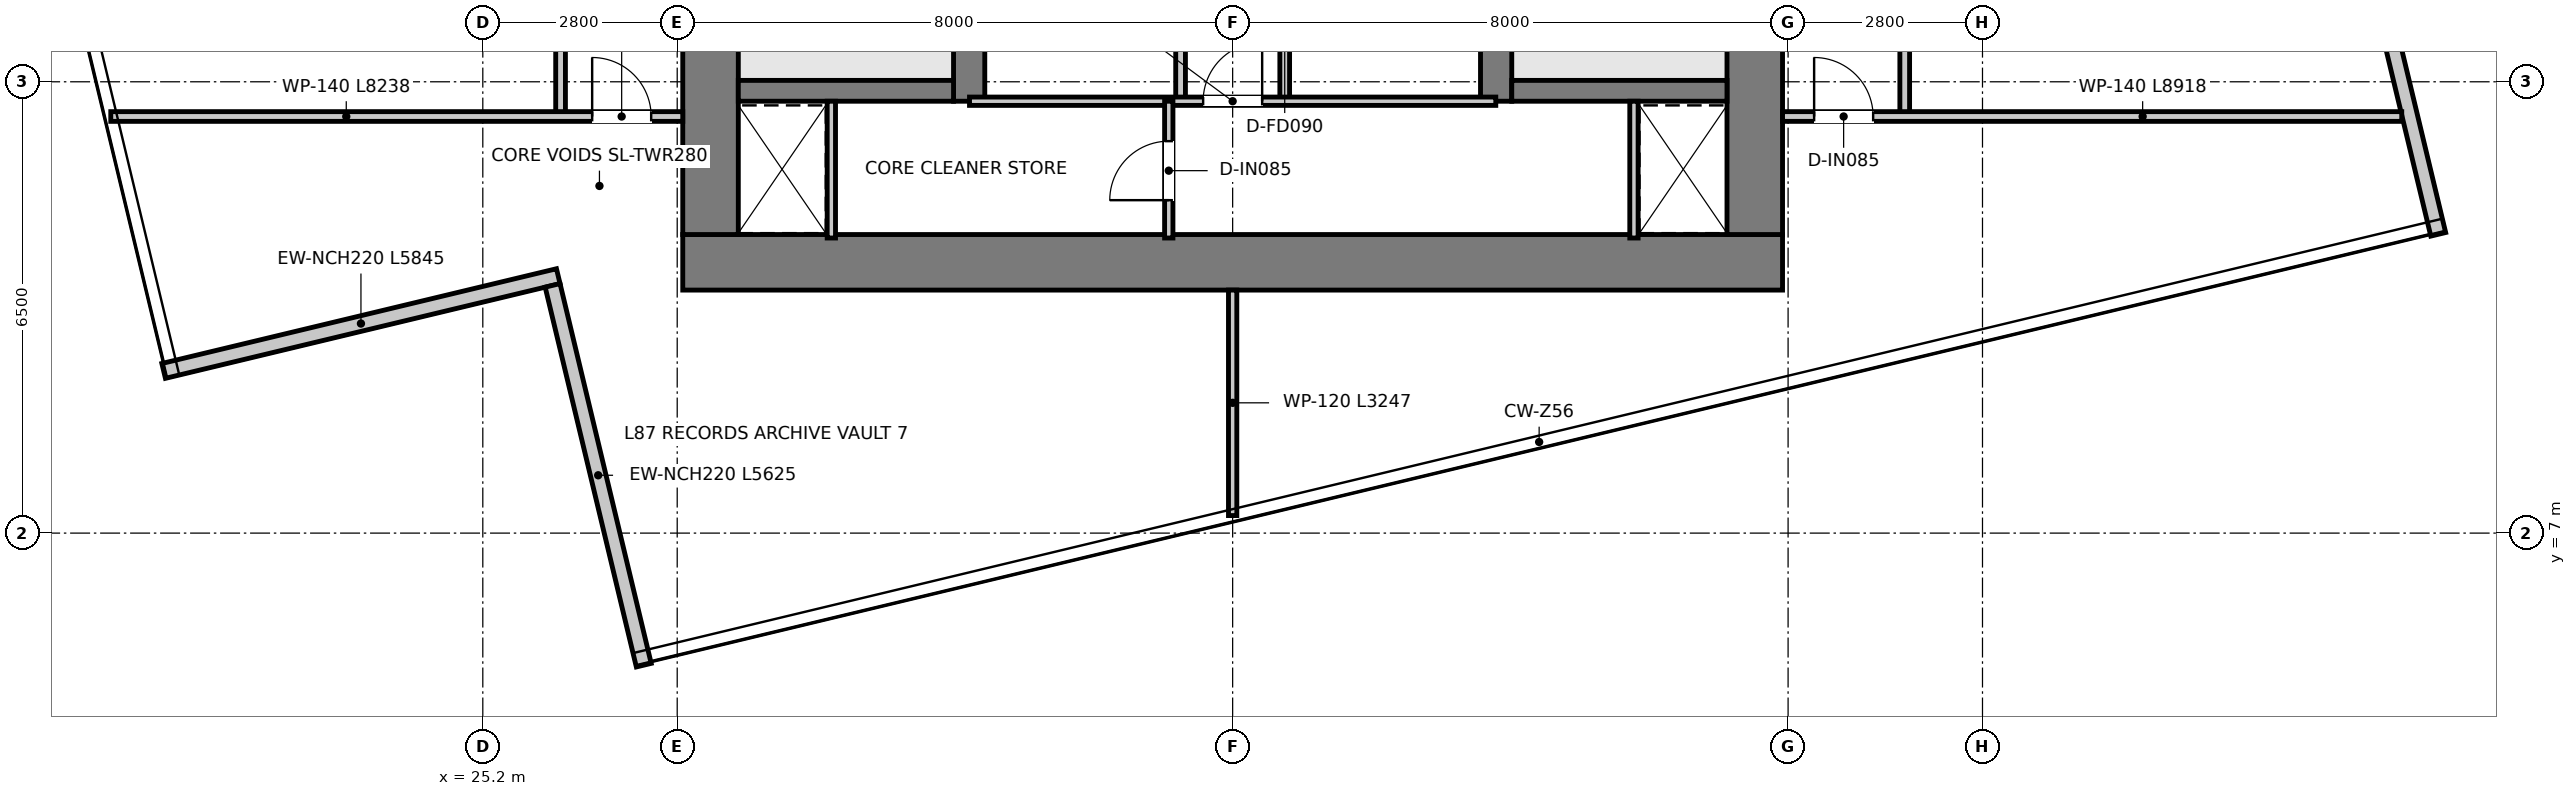
"""IFC4 building model, lengths in metres.
Left out: names, types, materials, properties, quantities, classifications, styles, units other than length and angle.
Written with IfcOpenShell. Run it as: python <this file> out.ifc"""

import sys

from ifc_helpers import new_model, si_unit, direction, frame, frame_2d, origin, place, context, subcontext, project, spatial, rectangle, extrude, element, fill, save


model = new_model("IFC4")
c1 = context("Model", 3, precision=1e-05, world=origin(), true_north=direction((0.0, 1.0)))
c2 = subcontext(c1, "Body", "Model", "MODEL_VIEW")
j1 = project(units=[si_unit("LENGTHUNIT", "METRE"), si_unit("PLANEANGLEUNIT", "RADIAN")], contexts=[c1])
p1 = place(None, origin())
s1 = spatial("IfcSite", under=j1, at=p1, CompositionType="ELEMENT")
p2 = place(p1, origin())
s2 = spatial("IfcBuilding", under=s1, at=p2, CompositionType="ELEMENT")
p3 = place(p2, frame((0.0, 0.0, 355.35)))
s3 = spatial("IfcBuildingStorey", under=s2, at=p3, CompositionType="ELEMENT", Elevation=355.35)
p4 = place(p3, frame((28.08, 10.9, 0.0), z_axis=(0.0, 0.0, 1.0), x_axis=(1.0, 0.0, 0.0)))
e1 = element("IfcWall", 1, at=p4, inside=s3, PredefinedType="SHEAR", context=c2, shape_type="SweptSolid", body=[
    extrude(rectangle(XDim=15.84, YDim=0.8, at=frame_2d((7.92, 0.0))), origin(), (0.0, 0.0, 1.0), 3.95),
])
for number, where, z_axis, x_axis in (
    (2, (28.48, 11.3, 0.0), (0.0, 0.0, 1.0), (0.0, 1.0, 0.0)),
    (3, (43.52, 11.3, 0.0), (0.0, 0.0, 1.0), (0.0, 1.0, 0.0)),
):
    element("IfcWall", number, at=place(p3, frame(where, z_axis=z_axis, x_axis=x_axis)), inside=s3, PredefinedType="SHEAR", context=c2, shape_type="SweptSolid", body=[
        extrude(rectangle(XDim=14.7, YDim=0.8, at=frame_2d((7.35, 0.0))), origin(), (0.0, 0.0, 1.0), 3.95),
    ])
p5 = place(p3, frame((32.205, 13.22, 0.0), z_axis=(0.0, 0.0, 1.0), x_axis=(0.0, 1.0, 0.0)))
e4 = element("IfcWall", 4, at=p5, inside=s3, PredefinedType="SHEAR", context=c2, shape_type="SweptSolid", body=[
    extrude(rectangle(XDim=12.78, YDim=0.45, at=frame_2d((6.39, 0.0))), origin(), (0.0, 0.0, 1.0), 3.95),
])
p6 = place(p5, frame((10.58, 0.0, 0.0)))
e5 = element("IfcOpeningElement", 5, at=p6, cuts=e4, PredefinedType="OPENING", context=c2, shape_type="SweptSolid", body=[
    extrude(rectangle(XDim=1.1, YDim=2.15, at=frame_2d((0.55, 1.075))), frame((0.0, 0.235, 0.0), z_axis=(0.0, -1.0, 0.0), x_axis=(1.0, 0.0, 0.0)), (0.0, 0.0, 1.0), 0.47),
])
p7 = place(p3, frame((39.795, 13.22, 0.0), z_axis=(0.0, 0.0, 1.0), x_axis=(0.0, 1.0, 0.0)))
e6 = element("IfcWall", 6, at=p7, inside=s3, PredefinedType="SHEAR", context=c2, shape_type="SweptSolid", body=[
    extrude(rectangle(XDim=12.78, YDim=0.45, at=frame_2d((6.39, 0.0))), origin(), (0.0, 0.0, 1.0), 3.95),
])
p8 = place(p7, frame((10.58, 0.0, 0.0)))
e7 = element("IfcOpeningElement", 7, at=p8, cuts=e6, PredefinedType="OPENING", context=c2, shape_type="SweptSolid", body=[
    extrude(rectangle(XDim=1.1, YDim=2.15, at=frame_2d((0.55, 1.075))), frame((0.0, 0.235, 0.0), z_axis=(0.0, -1.0, 0.0), x_axis=(1.0, 0.0, 0.0)), (0.0, 0.0, 1.0), 0.47),
])
for number, where, z_axis, x_axis in (
    (8, (28.88, 13.37, 0.0), (0.0, 0.0, 1.0), (1.0, 0.0, 0.0)),
    (9, (40.02, 13.37, 0.0), (0.0, 0.0, 1.0), (1.0, 0.0, 0.0)),
):
    element("IfcWall", number, at=place(p3, frame(where, z_axis=z_axis, x_axis=x_axis)), inside=s3, PredefinedType="SHEAR", context=c2, shape_type="SweptSolid", body=[
        extrude(rectangle(XDim=3.1, YDim=0.3, at=frame_2d((1.55, 0.0))), origin(), (0.0, 0.0, 1.0), 3.95),
    ])
p9 = place(p3, frame((20.603, 9.336, 0.0), z_axis=(0.0, 0.0, 1.0), x_axis=(0.972367961768, 0.233453521986, 0.0)))
e10 = element("IfcWall", 10, at=p9, inside=s3, PredefinedType="ELEMENTEDWALL", context=c2, shape_type="SweptSolid", body=[
    extrude(rectangle(XDim=5.845, YDim=0.22, at=frame_2d((2.922, 0.0))), origin(), (0.0, 0.0, 1.0), 3.67),
])
p10 = place(p3, frame((26.205, 10.568, 0.0), z_axis=(0.0, 0.0, 1.0), x_axis=(0.233456668573, -0.972367206306, 0.0)))
e11 = element("IfcWall", 11, at=p10, inside=s3, PredefinedType="ELEMENTEDWALL", context=c2, shape_type="SweptSolid", body=[
    extrude(rectangle(XDim=5.625, YDim=0.22, at=frame_2d((2.812, 0.0))), origin(), (0.0, 0.0, 1.0), 3.67),
])
p11 = place(p3, frame((53.364, 11.303, 0.0), z_axis=(0.0, 0.0, 1.0), x_axis=(-0.233453521986, 0.972367961768, 0.0)))
e12 = element("IfcWall", 12, at=p11, inside=s3, PredefinedType="ELEMENTEDWALL", context=c2, shape_type="SweptSolid", body=[
    extrude(rectangle(XDim=5.845, YDim=0.22, at=frame_2d((2.922, 0.0))), origin(), (0.0, 0.0, 1.0), 3.67),
])
p12 = place(p3, frame((35.25, 13.22, 0.0), z_axis=(0.0, 0.0, 1.0), x_axis=(0.0, 1.0, 0.0)))
e13 = element("IfcWall", 13, at=p12, inside=s3, PredefinedType="PARTITIONING", context=c2, shape_type="SweptSolid", body=[
    extrude(rectangle(XDim=4.56, YDim=0.14, at=frame_2d((2.28, 0.0))), origin(), (0.0, 0.0, 1.0), 3.67),
])
p13 = place(p12, frame((1.93, 0.0, 0.0)))
e14 = element("IfcOpeningElement", 14, at=p13, cuts=e13, PredefinedType="OPENING", context=c2, shape_type="SweptSolid", body=[
    extrude(rectangle(XDim=0.9, YDim=2.1, at=frame_2d((0.45, 1.05))), frame((0.0, 0.08, 0.0), z_axis=(0.0, -1.0, 0.0), x_axis=(1.0, 0.0, 0.0)), (0.0, 0.0, 1.0), 0.16),
])
p14 = place(p3, frame((36.75, 13.22, 0.0), z_axis=(0.0, 0.0, 1.0), x_axis=(0.0, 1.0, 0.0)))
e15 = element("IfcWall", 15, at=p14, inside=s3, PredefinedType="PARTITIONING", context=c2, shape_type="SweptSolid", body=[
    extrude(rectangle(XDim=4.56, YDim=0.14, at=frame_2d((2.28, 0.0))), origin(), (0.0, 0.0, 1.0), 3.67),
])
p15 = place(p14, frame((1.93, 0.0, 0.0)))
e16 = element("IfcOpeningElement", 16, at=p15, cuts=e15, PredefinedType="OPENING", context=c2, shape_type="SweptSolid", body=[
    extrude(rectangle(XDim=0.9, YDim=2.1, at=frame_2d((0.45, 1.05))), frame((0.0, 0.08, 0.0), z_axis=(0.0, -1.0, 0.0), x_axis=(1.0, 0.0, 0.0)), (0.0, 0.0, 1.0), 0.16),
])
for number, where, z_axis, x_axis in (
    (17, (30.22, 11.25, 0.0), (0.0, 0.0, 1.0), (0.0, 1.0, 0.0)),
    (18, (41.78, 11.25, 0.0), (0.0, 0.0, 1.0), (0.0, 1.0, 0.0)),
):
    element("IfcWall", number, at=place(p3, frame(where, z_axis=z_axis, x_axis=x_axis)), inside=s3, PredefinedType="PARTITIONING", context=c2, shape_type="SweptSolid", body=[
        extrude(rectangle(XDim=1.97, YDim=0.12, at=frame_2d((0.985, 0.0))), origin(), (0.0, 0.0, 1.0), 3.67),
    ])
p16 = place(p3, frame((32.21, 13.22, 0.0), z_axis=(0.0, 0.0, 1.0), x_axis=(1.0, 0.0, 0.0)))
e19 = element("IfcWall", 19, at=p16, inside=s3, PredefinedType="PARTITIONING", context=c2, shape_type="SweptSolid", body=[
    extrude(rectangle(XDim=7.58, YDim=0.12, at=frame_2d((3.79, 0.0))), origin(), (0.0, 0.0, 1.0), 3.67),
])
p17 = place(p16, frame((3.365, 0.0, 0.0)))
e20 = element("IfcOpeningElement", 20, at=p17, cuts=e19, PredefinedType="OPENING", context=c2, shape_type="SweptSolid", body=[
    extrude(rectangle(XDim=0.85, YDim=2.1, at=frame_2d((0.425, 1.05))), frame((0.0, 0.07, 0.0), z_axis=(0.0, -1.0, 0.0), x_axis=(1.0, 0.0, 0.0)), (0.0, 0.0, 1.0), 0.14),
])
p18 = place(p3, frame((35.08, 11.25, 0.0), z_axis=(0.0, 0.0, 1.0), x_axis=(0.0, 1.0, 0.0)))
e21 = element("IfcWall", 21, at=p18, inside=s3, PredefinedType="PARTITIONING", context=c2, shape_type="SweptSolid", body=[
    extrude(rectangle(XDim=1.97, YDim=0.12, at=frame_2d((0.985, 0.0))), origin(), (0.0, 0.0, 1.0), 3.67),
])
p19 = place(p18, frame((0.545, 0.0, 0.0)))
e22 = element("IfcOpeningElement", 22, at=p19, cuts=e21, PredefinedType="OPENING", context=c2, shape_type="SweptSolid", body=[
    extrude(rectangle(XDim=0.85, YDim=2.1, at=frame_2d((0.425, 1.05))), frame((0.0, 0.07, 0.0), z_axis=(0.0, -1.0, 0.0), x_axis=(1.0, 0.0, 0.0)), (0.0, 0.0, 1.0), 0.14),
])
p20 = place(p3, frame((26.32, 13.0, 0.0), z_axis=(0.0, 0.0, 1.0), x_axis=(0.0, 1.0, 0.0)))
e23 = element("IfcWall", 23, at=p20, inside=s3, PredefinedType="PARTITIONING", context=c2, shape_type="SweptSolid", body=[
    extrude(rectangle(XDim=15.66, YDim=0.14, at=frame_2d((7.83, 0.0))), origin(), (0.0, 0.0, 1.0), 3.13),
])
p21 = place(p20, frame((14.3, 0.0, 0.0)))
e24 = element("IfcOpeningElement", 24, at=p21, cuts=e23, PredefinedType="OPENING", context=c2, shape_type="SweptSolid", body=[
    extrude(rectangle(XDim=0.9, YDim=2.1, at=frame_2d((0.45, 1.05))), frame((0.0, 0.08, 0.0), z_axis=(0.0, -1.0, 0.0), x_axis=(1.0, 0.0, 0.0)), (0.0, 0.0, 1.0), 0.16),
])
p22 = place(p20, frame((6.55, 0.0, 0.0)))
e25 = element("IfcOpeningElement", 25, at=p22, cuts=e23, PredefinedType="OPENING", context=c2, shape_type="SweptSolid", body=[
    extrude(rectangle(XDim=0.9, YDim=2.1, at=frame_2d((0.45, 1.05))), frame((0.0, 0.08, 0.0), z_axis=(0.0, -1.0, 0.0), x_axis=(1.0, 0.0, 0.0)), (0.0, 0.0, 1.0), 0.16),
])
p23 = place(p20, frame((11.21, 0.0, 0.0)))
e26 = element("IfcOpeningElement", 26, at=p23, cuts=e23, PredefinedType="OPENING", context=c2, shape_type="SweptSolid", body=[
    extrude(rectangle(XDim=0.9, YDim=2.1, at=frame_2d((0.45, 1.05))), frame((0.0, 0.08, 0.0), z_axis=(0.0, -1.0, 0.0), x_axis=(1.0, 0.0, 0.0)), (0.0, 0.0, 1.0), 0.16),
])
p24 = place(p3, frame((45.68, 13.0, 0.0), z_axis=(0.0, 0.0, 1.0), x_axis=(0.0, 1.0, 0.0)))
e27 = element("IfcWall", 27, at=p24, inside=s3, PredefinedType="PARTITIONING", context=c2, shape_type="SweptSolid", body=[
    extrude(rectangle(XDim=15.66, YDim=0.14, at=frame_2d((7.83, 0.0))), origin(), (0.0, 0.0, 1.0), 3.13),
])
p25 = place(p24, frame((14.3, 0.0, 0.0)))
e28 = element("IfcOpeningElement", 28, at=p25, cuts=e27, PredefinedType="OPENING", context=c2, shape_type="SweptSolid", body=[
    extrude(rectangle(XDim=0.9, YDim=2.1, at=frame_2d((0.45, 1.05))), frame((0.0, 0.08, 0.0), z_axis=(0.0, -1.0, 0.0), x_axis=(1.0, 0.0, 0.0)), (0.0, 0.0, 1.0), 0.16),
])
p26 = place(p24, frame((6.55, 0.0, 0.0)))
e29 = element("IfcOpeningElement", 29, at=p26, cuts=e27, PredefinedType="OPENING", context=c2, shape_type="SweptSolid", body=[
    extrude(rectangle(XDim=0.9, YDim=2.1, at=frame_2d((0.45, 1.05))), frame((0.0, 0.08, 0.0), z_axis=(0.0, -1.0, 0.0), x_axis=(1.0, 0.0, 0.0)), (0.0, 0.0, 1.0), 0.16),
])
p27 = place(p24, frame((11.21, 0.0, 0.0)))
e30 = element("IfcOpeningElement", 30, at=p27, cuts=e27, PredefinedType="OPENING", context=c2, shape_type="SweptSolid", body=[
    extrude(rectangle(XDim=0.9, YDim=2.1, at=frame_2d((0.45, 1.05))), frame((0.0, 0.08, 0.0), z_axis=(0.0, -1.0, 0.0), x_axis=(1.0, 0.0, 0.0)), (0.0, 0.0, 1.0), 0.16),
])
p28 = place(p3, frame((19.842, 13.0, 0.0), z_axis=(0.0, 0.0, 1.0), x_axis=(1.0, 0.0, 0.0)))
e31 = element("IfcWall", 31, at=p28, inside=s3, PredefinedType="PARTITIONING", context=c2, shape_type="SweptSolid", body=[
    extrude(rectangle(XDim=8.238, YDim=0.14, at=frame_2d((4.119, 0.0))), origin(), (0.0, 0.0, 1.0), 3.18),
])
p29 = place(p28, frame((6.933, 0.0, 0.0)))
e32 = element("IfcOpeningElement", 32, at=p29, cuts=e31, PredefinedType="OPENING", context=c2, shape_type="SweptSolid", body=[
    extrude(rectangle(XDim=0.85, YDim=2.1, at=frame_2d((0.425, 1.05))), frame((0.0, 0.08, 0.0), z_axis=(0.0, -1.0, 0.0), x_axis=(1.0, 0.0, 0.0)), (0.0, 0.0, 1.0), 0.16),
])
p30 = place(p3, frame((43.92, 13.0, 0.0), z_axis=(0.0, 0.0, 1.0), x_axis=(1.0, 0.0, 0.0)))
e33 = element("IfcWall", 33, at=p30, inside=s3, PredefinedType="PARTITIONING", context=c2, shape_type="SweptSolid", body=[
    extrude(rectangle(XDim=8.918, YDim=0.14, at=frame_2d((4.459, 0.0))), origin(), (0.0, 0.0, 1.0), 3.18),
])
p31 = place(p30, frame((0.455, 0.0, 0.0)))
e34 = element("IfcOpeningElement", 34, at=p31, cuts=e33, PredefinedType="OPENING", context=c2, shape_type="SweptSolid", body=[
    extrude(rectangle(XDim=0.85, YDim=2.1, at=frame_2d((0.425, 1.05))), frame((0.0, 0.08, 0.0), z_axis=(0.0, -1.0, 0.0), x_axis=(1.0, 0.0, 0.0)), (0.0, 0.0, 1.0), 0.16),
])
p32 = place(p3, frame((36.0, 7.253, 0.0), z_axis=(0.0, 0.0, 1.0), x_axis=(0.0, 1.0, 0.0)))
e35 = element("IfcWall", 35, at=p32, inside=s3, PredefinedType="PARTITIONING", context=c2, shape_type="SweptSolid", body=[
    extrude(rectangle(XDim=3.247, YDim=0.12, at=frame_2d((1.624, 0.0))), origin(), (0.0, 0.0, 1.0), 3.67),
])
p33 = place(p17, origin())
e36 = element("IfcDoor", 36, at=p33, inside=s3, OperationType="SINGLE_SWING_RIGHT", PredefinedType="DOOR", context=c2, shape_type="SweptSolid", body=[
    extrude(rectangle(XDim=0.85, YDim=2.1, at=frame_2d((0.425, 1.05))), frame((0.0, 0.025, 0.0), z_axis=(0.0, -1.0, 0.0), x_axis=(1.0, 0.0, 0.0)), (0.0, 0.0, 1.0), 0.05),
])
fill(e20, e36)
p34 = place(p19, origin())
e37 = element("IfcDoor", 37, at=p34, inside=s3, OperationType="SINGLE_SWING_LEFT", PredefinedType="DOOR", context=c2, shape_type="SweptSolid", body=[
    extrude(rectangle(XDim=0.85, YDim=2.1, at=frame_2d((0.425, 1.05))), frame((0.0, 0.025, 0.0), z_axis=(0.0, -1.0, 0.0), x_axis=(1.0, 0.0, 0.0)), (0.0, 0.0, 1.0), 0.05),
])
fill(e22, e37)
p35 = place(p29, origin())
e38 = element("IfcDoor", 38, at=p35, inside=s3, OperationType="SINGLE_SWING_LEFT", PredefinedType="DOOR", context=c2, shape_type="SweptSolid", body=[
    extrude(rectangle(XDim=0.85, YDim=2.1, at=frame_2d((0.425, 1.05))), frame((0.0, 0.025, 0.0), z_axis=(0.0, -1.0, 0.0), x_axis=(1.0, 0.0, 0.0)), (0.0, 0.0, 1.0), 0.05),
])
fill(e32, e38)
p36 = place(p31, origin())
e39 = element("IfcDoor", 39, at=p36, inside=s3, OperationType="SINGLE_SWING_LEFT", PredefinedType="DOOR", context=c2, shape_type="SweptSolid", body=[
    extrude(rectangle(XDim=0.85, YDim=2.1, at=frame_2d((0.425, 1.05))), frame((0.0, 0.025, 0.0), z_axis=(0.0, -1.0, 0.0), x_axis=(1.0, 0.0, 0.0)), (0.0, 0.0, 1.0), 0.05),
])
fill(e34, e39)
save(model, sys.argv[1])
